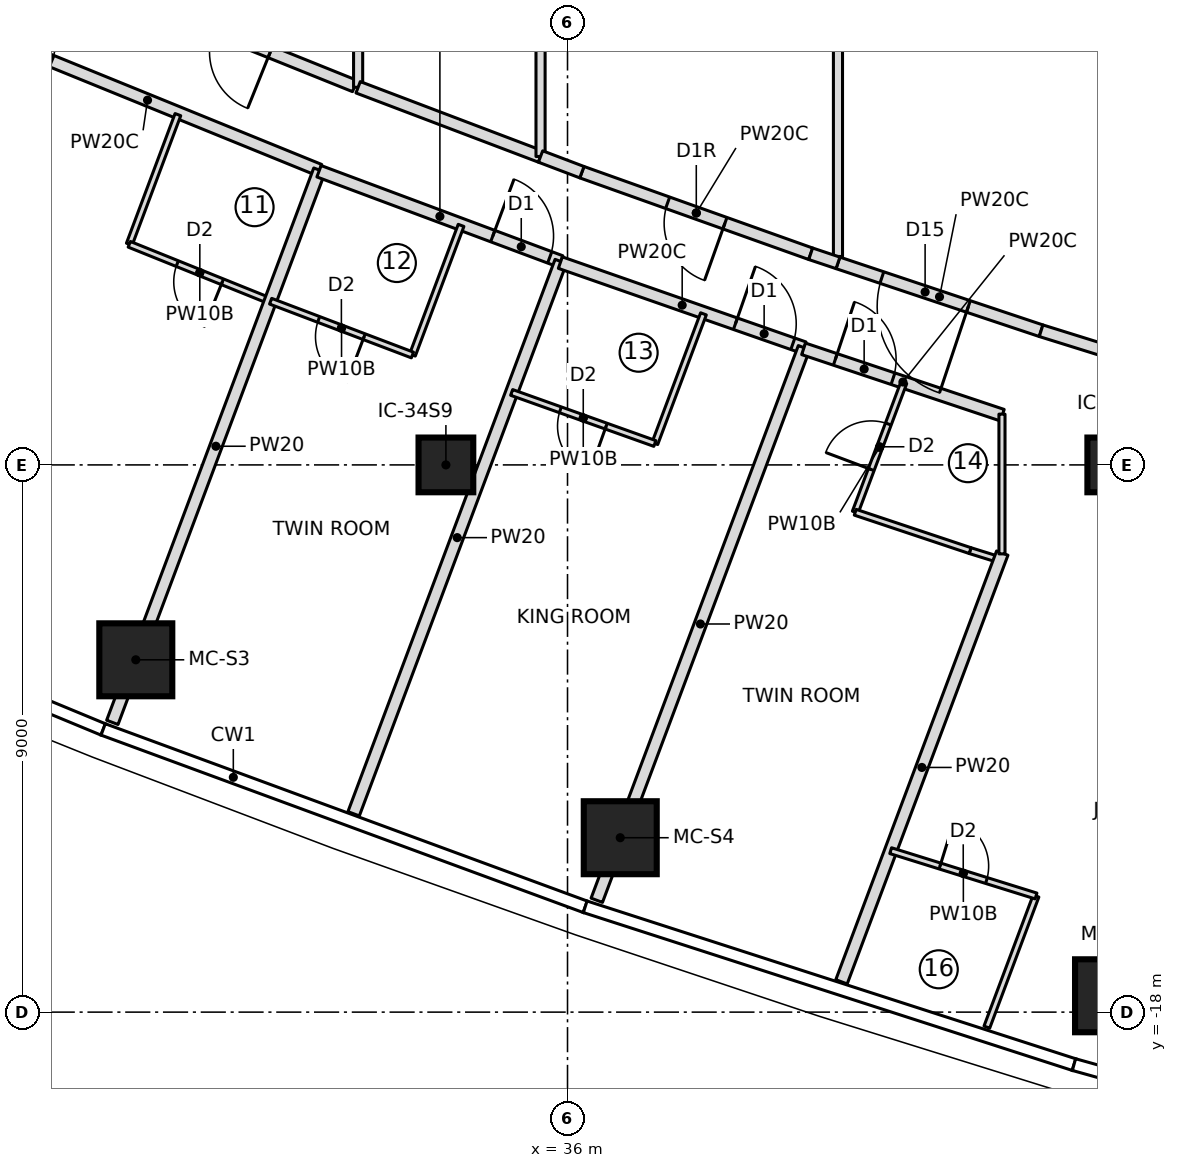
"""IFC4 building model, lengths in metres.
Left out: names, types, materials, properties, quantities, classifications, styles, units other than length and angle.
Written with IfcOpenShell. Run it as: python <this file> out.ifc"""

import sys

from ifc_helpers import new_model, si_unit, direction, frame, frame_2d, origin, origin_2d, place, context, subcontext, project, spatial, rectangle, extrude, element, fill, save


model = new_model("IFC4")
c1 = context("Model", 3, precision=1e-05, world=origin(), true_north=direction((0.0, 1.0)))
c2 = subcontext(c1, "Body", "Model", "MODEL_VIEW")
j1 = project(units=[si_unit("LENGTHUNIT", "METRE"), si_unit("PLANEANGLEUNIT", "RADIAN")], contexts=[c1])
p1 = place(None, origin())
s1 = spatial("IfcSite", under=j1, at=p1, CompositionType="ELEMENT")
p2 = place(p1, origin())
s2 = spatial("IfcBuilding", under=s1, at=p2, CompositionType="ELEMENT")
p3 = place(p2, frame((0.0, 0.0, 220.8)))
s3 = spatial("IfcBuildingStorey", under=s2, at=p3, CompositionType="ELEMENT", Elevation=220.8)
for number, where, z_axis, x_axis in (
    (1, (28.9, -12.205, 0.0), (0.0, 0.0, 1.0), (1.0, 0.0, 0.0)),
    (2, (36.867, -15.132, 0.0), (0.0, 0.0, 1.0), (1.0, 0.0, 0.0)),
    (3, (44.947, -17.731, 0.0), (0.0, 0.0, 1.0), (1.0, 0.0, 0.0)),
):
    element("IfcColumn", number, at=place(p3, frame(where, z_axis=z_axis, x_axis=x_axis)), inside=s3, PredefinedType="COLUMN", context=c2, shape_type="SweptSolid", body=[
        extrude(rectangle(XDim=1.2, YDim=1.2, at=origin_2d()), origin(), (0.0, 0.0, 1.0), 3.55),
    ])
for number, where, z_axis, x_axis in (
    (4, (34.0, -9.0, 0.0), (0.0, 0.0, 1.0), (1.0, 0.0, 0.0)),
    (5, (45.0, -9.0, 0.0), (0.0, 0.0, 1.0), (1.0, 0.0, 0.0)),
):
    element("IfcColumn", number, at=place(p3, frame(where, z_axis=z_axis, x_axis=x_axis)), inside=s3, PredefinedType="COLUMN", context=c2, shape_type="SweptSolid", body=[
        extrude(rectangle(XDim=0.9, YDim=0.9, at=origin_2d()), origin(), (0.0, 0.0, 1.0), 3.55),
    ])
p4 = place(p3, frame((26.266, -1.85, 0.0), z_axis=(0.0, 0.0, 1.0), x_axis=(0.926231512449, -0.376955150311, 0.0)))
e6 = element("IfcWall", 6, at=p4, inside=s3, PredefinedType="PARTITIONING", context=c2, shape_type="SweptSolid", body=[
    extrude(rectangle(XDim=6.105, YDim=0.2, at=frame_2d((3.052, 0.0))), origin(), (0.0, 0.0, 1.0), 3.25),
])
p5 = place(p4, frame((0.35, 0.0, 0.0)))
e7 = element("IfcOpeningElement", 7, at=p5, cuts=e6, PredefinedType="OPENING", context=c2, shape_type="SweptSolid", body=[
    extrude(rectangle(XDim=1.0, YDim=2.1, at=frame_2d((0.5, 1.05))), frame((0.0, 0.11, 0.0), z_axis=(0.0, -1.0, 0.0), x_axis=(1.0, 0.0, 0.0)), (0.0, 0.0, 1.0), 0.22),
])
p6 = place(p3, frame((28.793, -5.371, 0.0), z_axis=(0.0, 0.0, 1.0), x_axis=(0.351158682313, 0.936315961541, 0.0)))
e8 = element("IfcWall", 8, at=p6, inside=s3, PredefinedType="PARTITIONING", context=c2, shape_type="SweptSolid", body=[
    extrude(rectangle(XDim=2.278, YDim=0.1, at=frame_2d((1.139, 0.0))), origin(), (0.0, 0.0, 1.0), 3.25),
])
p7 = place(p3, frame((31.113, -6.306, 0.0), z_axis=(0.0, 0.0, 1.0), x_axis=(-0.92761232595, 0.373544338394, 0.0)))
e9 = element("IfcWall", 9, at=p7, inside=s3, PredefinedType="PARTITIONING", context=c2, shape_type="SweptSolid", body=[
    extrude(rectangle(XDim=2.5, YDim=0.1, at=frame_2d((1.25, 0.0))), origin(), (0.0, 0.0, 1.0), 3.25),
])
p8 = place(p7, frame((0.85, 0.0, 0.0)))
e10 = element("IfcOpeningElement", 10, at=p8, cuts=e9, PredefinedType="OPENING", context=c2, shape_type="SweptSolid", body=[
    extrude(rectangle(XDim=0.8, YDim=2.1, at=frame_2d((0.4, 1.05))), frame((0.0, 0.06, 0.0), z_axis=(0.0, -1.0, 0.0), x_axis=(1.0, 0.0, 0.0)), (0.0, 0.0, 1.0), 0.12),
])
p9 = place(p3, frame((28.514, -13.235, 0.0), z_axis=(0.0, 0.0, 1.0), x_axis=(0.351126199585, 0.936328143316, 0.0)))
e11 = element("IfcWall", 11, at=p9, inside=s3, PredefinedType="PARTITIONING", context=c2, shape_type="SweptSolid", body=[
    extrude(rectangle(XDim=9.701, YDim=0.2, at=frame_2d((4.851, 0.0))), origin(), (0.0, 0.0, 1.0), 3.25),
])
p10 = place(p3, frame((31.913, -4.17, 0.0), z_axis=(0.0, 0.0, 1.0), x_axis=(0.936848300955, -0.349735987565, 0.0)))
e12 = element("IfcWall", 12, at=p10, inside=s3, PredefinedType="PARTITIONING", context=c2, shape_type="SweptSolid", body=[
    extrude(rectangle(XDim=4.244, YDim=0.2, at=frame_2d((2.122, 0.0))), origin(), (0.0, 0.0, 1.0), 3.25),
])
p11 = place(p10, frame((3.05, 0.0, 0.0)))
e13 = element("IfcOpeningElement", 13, at=p11, cuts=e12, PredefinedType="OPENING", context=c2, shape_type="SweptSolid", body=[
    extrude(rectangle(XDim=1.0, YDim=2.1, at=frame_2d((0.5, 1.05))), frame((0.0, 0.11, 0.0), z_axis=(0.0, -1.0, 0.0), x_axis=(1.0, 0.0, 0.0)), (0.0, 0.0, 1.0), 0.22),
])
p12 = place(p3, frame((34.25, -5.061, 0.0), z_axis=(0.0, 0.0, 1.0), x_axis=(-0.351135191353, -0.936324771323, 0.0)))
e14 = element("IfcWall", 14, at=p12, inside=s3, PredefinedType="PARTITIONING", context=c2, shape_type="SweptSolid", body=[
    extrude(rectangle(XDim=2.277, YDim=0.1, at=frame_2d((1.139, 0.0))), origin(), (0.0, 0.0, 1.0), 3.25),
])
p13 = place(p3, frame((33.45, -7.193, 0.0), z_axis=(0.0, 0.0, 1.0), x_axis=(-0.93495051617, 0.354778145202, 0.0)))
e15 = element("IfcWall", 15, at=p13, inside=s3, PredefinedType="PARTITIONING", context=c2, shape_type="SweptSolid", body=[
    extrude(rectangle(XDim=2.495, YDim=0.1, at=frame_2d((1.247, 0.0))), origin(), (0.0, 0.0, 1.0), 3.25),
])
p14 = place(p13, frame((0.85, 0.0, 0.0)))
e16 = element("IfcOpeningElement", 16, at=p14, cuts=e15, PredefinedType="OPENING", context=c2, shape_type="SweptSolid", body=[
    extrude(rectangle(XDim=0.8, YDim=2.1, at=frame_2d((0.4, 1.05))), frame((0.0, 0.06, 0.0), z_axis=(0.0, -1.0, 0.0), x_axis=(1.0, 0.0, 0.0)), (0.0, 0.0, 1.0), 0.12),
])
p15 = place(p3, frame((32.483, -14.738, 0.0), z_axis=(0.0, 0.0, 1.0), x_axis=(0.351117925717, 0.936331246002, 0.0)))
e17 = element("IfcWall", 17, at=p15, inside=s3, PredefinedType="PARTITIONING", context=c2, shape_type="SweptSolid", body=[
    extrude(rectangle(XDim=9.701, YDim=0.2, at=frame_2d((4.851, 0.0))), origin(), (0.0, 0.0, 1.0), 3.25),
])
p16 = place(p3, frame((35.882, -5.673, 0.0), z_axis=(0.0, 0.0, 1.0), x_axis=(0.944107376821, -0.329638075823, 0.0)))
e18 = element("IfcWall", 18, at=p16, inside=s3, PredefinedType="PARTITIONING", context=c2, shape_type="SweptSolid", body=[
    extrude(rectangle(XDim=4.245, YDim=0.2, at=frame_2d((2.122, 0.0))), origin(), (0.0, 0.0, 1.0), 3.25),
])
p17 = place(p16, frame((3.05, 0.0, 0.0)))
e19 = element("IfcOpeningElement", 19, at=p17, cuts=e18, PredefinedType="OPENING", context=c2, shape_type="SweptSolid", body=[
    extrude(rectangle(XDim=1.0, YDim=2.1, at=frame_2d((0.5, 1.05))), frame((0.0, 0.11, 0.0), z_axis=(0.0, -1.0, 0.0), x_axis=(1.0, 0.0, 0.0)), (0.0, 0.0, 1.0), 0.22),
])
p18 = place(p3, frame((38.236, -6.516, 0.0), z_axis=(0.0, 0.0, 1.0), x_axis=(-0.351229183496, -0.936289517543, 0.0)))
e20 = element("IfcWall", 20, at=p18, inside=s3, PredefinedType="PARTITIONING", context=c2, shape_type="SweptSolid", body=[
    extrude(rectangle(XDim=2.277, YDim=0.1, at=frame_2d((1.139, 0.0))), origin(), (0.0, 0.0, 1.0), 3.25),
])
p19 = place(p3, frame((37.436, -8.648, 0.0), z_axis=(0.0, 0.0, 1.0), x_axis=(-0.941896455552, 0.335903359641, 0.0)))
e21 = element("IfcWall", 21, at=p19, inside=s3, PredefinedType="PARTITIONING", context=c2, shape_type="SweptSolid", body=[
    extrude(rectangle(XDim=2.5, YDim=0.1, at=frame_2d((1.25, 0.0))), origin(), (0.0, 0.0, 1.0), 3.25),
])
p20 = place(p19, frame((0.85, 0.0, 0.0)))
e22 = element("IfcOpeningElement", 22, at=p20, cuts=e21, PredefinedType="OPENING", context=c2, shape_type="SweptSolid", body=[
    extrude(rectangle(XDim=0.8, YDim=2.1, at=frame_2d((0.4, 1.05))), frame((0.0, 0.06, 0.0), z_axis=(0.0, -1.0, 0.0), x_axis=(1.0, 0.0, 0.0)), (0.0, 0.0, 1.0), 0.12),
])
p21 = place(p3, frame((36.481, -16.161, 0.0), z_axis=(0.0, 0.0, 1.0), x_axis=(0.35112895446, 0.936327110224, 0.0)))
e23 = element("IfcWall", 23, at=p21, inside=s3, PredefinedType="PARTITIONING", context=c2, shape_type="SweptSolid", body=[
    extrude(rectangle(XDim=9.706, YDim=0.2, at=frame_2d((4.853, 0.0))), origin(), (0.0, 0.0, 1.0), 3.25),
])
p22 = place(p3, frame((39.882, -7.091, 0.0), z_axis=(0.0, 0.0, 1.0), x_axis=(0.948477584784, -0.316844238013, 0.0)))
e24 = element("IfcWall", 24, at=p22, inside=s3, PredefinedType="PARTITIONING", context=c2, shape_type="SweptSolid", body=[
    extrude(rectangle(XDim=3.445, YDim=0.2, at=frame_2d((1.723, 0.0))), origin(), (0.0, 0.0, 1.0), 3.25),
])
p23 = place(p22, frame((0.55, 0.0, 0.0)))
e25 = element("IfcOpeningElement", 25, at=p23, cuts=e24, PredefinedType="OPENING", context=c2, shape_type="SweptSolid", body=[
    extrude(rectangle(XDim=1.0, YDim=2.1, at=frame_2d((0.5, 1.05))), frame((0.0, 0.11, 0.0), z_axis=(0.0, -1.0, 0.0), x_axis=(1.0, 0.0, 0.0)), (0.0, 0.0, 1.0), 0.22),
])
p24 = place(p3, frame((40.732, -9.779, 0.0), z_axis=(0.0, 0.0, 1.0), x_axis=(0.351146927505, 0.936320370014, 0.0)))
e26 = element("IfcWall", 26, at=p24, inside=s3, PredefinedType="PARTITIONING", context=c2, shape_type="SweptSolid", body=[
    extrude(rectangle(XDim=2.278, YDim=0.1, at=frame_2d((1.139, 0.0))), origin(), (0.0, 0.0, 1.0), 3.25),
])
p25 = place(p24, frame((0.75, 0.0, 0.0)))
e27 = element("IfcOpeningElement", 27, at=p25, cuts=e26, PredefinedType="OPENING", context=c2, shape_type="SweptSolid", body=[
    extrude(rectangle(XDim=0.8, YDim=2.1, at=frame_2d((0.4, 1.05))), frame((0.0, 0.06, 0.0), z_axis=(0.0, -1.0, 0.0), x_axis=(1.0, 0.0, 0.0)), (0.0, 0.0, 1.0), 0.12),
])
p26 = place(p3, frame((43.108, -10.562, 0.0), z_axis=(0.0, 0.0, 1.0), x_axis=(-0.954624465478, 0.297812239356, 0.0)))
e28 = element("IfcWall", 28, at=p26, inside=s3, PredefinedType="PARTITIONING", context=c2, shape_type="SweptSolid", body=[
    extrude(rectangle(XDim=0.511, YDim=0.1, at=frame_2d((0.255, 0.0))), origin(), (0.0, 0.0, 1.0), 3.25),
])
p27 = place(p3, frame((42.621, -10.409, 0.0), z_axis=(0.0, 0.0, 1.0), x_axis=(-0.948499248693, 0.316779379426, 0.0)))
e29 = element("IfcWall", 29, at=p27, inside=s3, PredefinedType="PARTITIONING", context=c2, shape_type="SweptSolid", body=[
    extrude(rectangle(XDim=1.991, YDim=0.1, at=frame_2d((0.996, 0.0))), origin(), (0.0, 0.0, 1.0), 3.25),
])
p28 = place(p3, frame((40.506, -17.501, 0.0), z_axis=(0.0, 0.0, 1.0), x_axis=(0.351119888923, 0.936330509811, 0.0)))
e30 = element("IfcWall", 30, at=p28, inside=s3, PredefinedType="PARTITIONING", context=c2, shape_type="SweptSolid", body=[
    extrude(rectangle(XDim=7.531, YDim=0.2, at=frame_2d((3.766, 0.0))), origin(), (0.0, 0.0, 1.0), 3.25),
])
p29 = place(p3, frame((43.705, -16.09, 0.0), z_axis=(0.0, 0.0, 1.0), x_axis=(-0.351111827312, -0.936333532841, 0.0)))
e31 = element("IfcWall", 31, at=p29, inside=s3, PredefinedType="PARTITIONING", context=c2, shape_type="SweptSolid", body=[
    extrude(rectangle(XDim=2.304, YDim=0.1, at=frame_2d((1.152, 0.0))), origin(), (0.0, 0.0, 1.0), 3.25),
])
p30 = place(p3, frame((41.315, -15.344, 0.0), z_axis=(0.0, 0.0, 1.0), x_axis=(0.954665433195, -0.297680887299, 0.0)))
e32 = element("IfcWall", 32, at=p30, inside=s3, PredefinedType="PARTITIONING", context=c2, shape_type="SweptSolid", body=[
    extrude(rectangle(XDim=2.504, YDim=0.1, at=frame_2d((1.252, 0.0))), origin(), (0.0, 0.0, 1.0), 3.25),
])
p31 = place(p30, frame((0.85, 0.0, 0.0)))
e33 = element("IfcOpeningElement", 33, at=p31, cuts=e32, PredefinedType="OPENING", context=c2, shape_type="SweptSolid", body=[
    extrude(rectangle(XDim=0.8, YDim=2.1, at=frame_2d((0.4, 1.05))), frame((0.0, 0.06, 0.0), z_axis=(0.0, -1.0, 0.0), x_axis=(1.0, 0.0, 0.0)), (0.0, 0.0, 1.0), 0.12),
])
p32 = place(p3, frame((32.501, -2.768, 0.0), z_axis=(0.0, 0.0, 1.0), x_axis=(-0.927622894464, 0.373518092823, 0.0)))
e34 = element("IfcWall", 34, at=p32, inside=s3, PredefinedType="PARTITIONING", context=c2, shape_type="SweptSolid", body=[
    extrude(rectangle(XDim=3.995, YDim=0.2, at=frame_2d((1.998, 0.0))), origin(), (0.0, 0.0, 1.0), 3.25),
])
p33 = place(p32, frame((1.498, 0.0, 0.0)))
e35 = element("IfcOpeningElement", 35, at=p33, cuts=e34, PredefinedType="OPENING", context=c2, shape_type="SweptSolid", body=[
    extrude(rectangle(XDim=1.0, YDim=2.1, at=frame_2d((0.5, 1.05))), frame((0.0, 0.11, 0.0), z_axis=(0.0, -1.0, 0.0), x_axis=(1.0, 0.0, 0.0)), (0.0, 0.0, 1.0), 0.22),
])
p34 = place(p3, frame((32.556, -2.789, 0.0), z_axis=(0.0, 0.0, 1.0), x_axis=(0.0, 1.0, 0.0)))
e36 = element("IfcWall", 36, at=p34, inside=s3, PredefinedType="PARTITIONING", context=c2, shape_type="SweptSolid", body=[
    extrude(rectangle(XDim=5.579, YDim=0.15, at=frame_2d((2.789, 0.0))), origin(), (0.0, 0.0, 1.0), 3.25),
])
p35 = place(p3, frame((35.556, -3.927, 0.0), z_axis=(0.0, 0.0, 1.0), x_axis=(-0.934971422854, 0.354723044706, 0.0)))
e37 = element("IfcWall", 37, at=p35, inside=s3, PredefinedType="PARTITIONING", context=c2, shape_type="SweptSolid", body=[
    extrude(rectangle(XDim=3.209, YDim=0.2, at=frame_2d((1.604, 0.0))), origin(), (0.0, 0.0, 1.0), 3.25),
])
p36 = place(p3, frame((35.556, -3.927, 0.0), z_axis=(0.0, 0.0, 1.0), x_axis=(0.0, 1.0, 0.0)))
e38 = element("IfcWall", 38, at=p36, inside=s3, PredefinedType="PARTITIONING", context=c2, shape_type="SweptSolid", body=[
    extrude(rectangle(XDim=7.855, YDim=0.15, at=frame_2d((3.927, 0.0))), origin(), (0.0, 0.0, 1.0), 3.25),
])
p37 = place(p3, frame((39.999, -5.527, 0.0), z_axis=(0.0, 0.0, 1.0), x_axis=(-0.941909090846, 0.335867927288, 0.0)))
e39 = element("IfcWall", 39, at=p37, inside=s3, PredefinedType="PARTITIONING", context=c2, shape_type="SweptSolid", body=[
    extrude(rectangle(XDim=3.995, YDim=0.2, at=frame_2d((1.998, 0.0))), origin(), (0.0, 0.0, 1.0), 3.25),
])
p38 = place(p37, frame((1.498, 0.0, 0.0)))
e40 = element("IfcOpeningElement", 40, at=p38, cuts=e39, PredefinedType="OPENING", context=c2, shape_type="SweptSolid", body=[
    extrude(rectangle(XDim=1.0, YDim=2.1, at=frame_2d((0.5, 1.05))), frame((0.0, 0.11, 0.0), z_axis=(0.0, -1.0, 0.0), x_axis=(1.0, 0.0, 0.0)), (0.0, 0.0, 1.0), 0.22),
])
p39 = place(p3, frame((36.236, -4.186, 0.0), z_axis=(0.0, 0.0, 1.0), x_axis=(-0.934928414106, 0.354836385533, 0.0)))
e41 = element("IfcWall", 41, at=p39, inside=s3, PredefinedType="PARTITIONING", context=c2, shape_type="SweptSolid", body=[
    extrude(rectangle(XDim=0.727, YDim=0.2, at=frame_2d((0.364, 0.0))), origin(), (0.0, 0.0, 1.0), 3.25),
])
p40 = place(p3, frame((40.448, -5.572, 0.0), z_axis=(0.0, 0.0, 1.0), x_axis=(0.0, 1.0, 0.0)))
e42 = element("IfcWall", 42, at=p40, inside=s3, PredefinedType="PARTITIONING", context=c2, shape_type="SweptSolid", body=[
    extrude(rectangle(XDim=11.249, YDim=0.15, at=frame_2d((5.625, 0.0))), origin(), (0.0, 0.0, 1.0), 3.25),
])
p41 = place(p3, frame((43.788, -6.793, 0.0), z_axis=(0.0, 0.0, 1.0), x_axis=(-0.948475139593, 0.316851557632, 0.0)))
e43 = element("IfcWall", 43, at=p41, inside=s3, PredefinedType="PARTITIONING", context=c2, shape_type="SweptSolid", body=[
    extrude(rectangle(XDim=3.522, YDim=0.2, at=frame_2d((1.761, 0.0))), origin(), (0.0, 0.0, 1.0), 3.25),
])
p42 = place(p41, frame((1.261, 0.0, 0.0)))
e44 = element("IfcOpeningElement", 44, at=p42, cuts=e43, PredefinedType="OPENING", context=c2, shape_type="SweptSolid", body=[
    extrude(rectangle(XDim=1.5, YDim=2.1, at=frame_2d((0.75, 1.05))), frame((0.0, 0.11, 0.0), z_axis=(0.0, -1.0, 0.0), x_axis=(1.0, 0.0, 0.0)), (0.0, 0.0, 1.0), 0.22),
])
p43 = place(p3, frame((44.933, -7.15, 0.0), z_axis=(0.0, 0.0, 1.0), x_axis=(-0.954693570678, 0.29759063511, 0.0)))
e45 = element("IfcWall", 45, at=p43, inside=s3, PredefinedType="PARTITIONING", context=c2, shape_type="SweptSolid", body=[
    extrude(rectangle(XDim=1.198, YDim=0.2, at=frame_2d((0.599, 0.0))), origin(), (0.0, 0.0, 1.0), 3.25),
])
p44 = place(p3, frame((43.145, -8.165, 0.0), z_axis=(0.0, 0.0, 1.0), x_axis=(0.0, -1.0, 0.0)))
e46 = element("IfcWall", 46, at=p44, inside=s3, PredefinedType="PARTITIONING", context=c2, shape_type="SweptSolid", body=[
    extrude(rectangle(XDim=2.298, YDim=0.1, at=frame_2d((1.149, 0.0))), origin(), (0.0, 0.0, 1.0), 3.25),
])
p45 = place(p3, frame((40.448, -5.677, 0.0), z_axis=(0.0, 0.0, 1.0), x_axis=(-0.948424836926, 0.317002095739, 0.0)))
e47 = element("IfcWall", 47, at=p45, inside=s3, PredefinedType="PARTITIONING", context=c2, shape_type="SweptSolid", body=[
    extrude(rectangle(XDim=0.473, YDim=0.2, at=frame_2d((0.236, 0.0))), origin(), (0.0, 0.0, 1.0), 3.25),
])
p46 = place(p8, origin())
e48 = element("IfcDoor", 48, at=p46, inside=s3, OperationType="SINGLE_SWING_LEFT", PredefinedType="DOOR", context=c2, shape_type="SweptSolid", body=[
    extrude(rectangle(XDim=0.8, YDim=2.1, at=frame_2d((0.4, 1.05))), frame((0.0, 0.025, 0.0), z_axis=(0.0, -1.0, 0.0), x_axis=(1.0, 0.0, 0.0)), (0.0, 0.0, 1.0), 0.05),
])
fill(e10, e48)
p47 = place(p5, origin())
e49 = element("IfcDoor", 49, at=p47, inside=s3, OperationType="SINGLE_SWING_LEFT", PredefinedType="DOOR", context=c2, shape_type="SweptSolid", body=[
    extrude(rectangle(XDim=1.0, YDim=2.1, at=frame_2d((0.5, 1.05))), frame((0.0, 0.025, 0.0), z_axis=(0.0, -1.0, 0.0), x_axis=(1.0, 0.0, 0.0)), (0.0, 0.0, 1.0), 0.05),
])
fill(e7, e49)
p48 = place(p14, origin())
e50 = element("IfcDoor", 50, at=p48, inside=s3, OperationType="SINGLE_SWING_LEFT", PredefinedType="DOOR", context=c2, shape_type="SweptSolid", body=[
    extrude(rectangle(XDim=0.8, YDim=2.1, at=frame_2d((0.4, 1.05))), frame((0.0, 0.025, 0.0), z_axis=(0.0, -1.0, 0.0), x_axis=(1.0, 0.0, 0.0)), (0.0, 0.0, 1.0), 0.05),
])
fill(e16, e50)
p49 = place(p11, origin())
e51 = element("IfcDoor", 51, at=p49, inside=s3, OperationType="SINGLE_SWING_LEFT", PredefinedType="DOOR", context=c2, shape_type="SweptSolid", body=[
    extrude(rectangle(XDim=1.0, YDim=2.1, at=frame_2d((0.5, 1.05))), frame((0.0, 0.025, 0.0), z_axis=(0.0, -1.0, 0.0), x_axis=(1.0, 0.0, 0.0)), (0.0, 0.0, 1.0), 0.05),
])
fill(e13, e51)
p50 = place(p20, origin())
e52 = element("IfcDoor", 52, at=p50, inside=s3, OperationType="SINGLE_SWING_LEFT", PredefinedType="DOOR", context=c2, shape_type="SweptSolid", body=[
    extrude(rectangle(XDim=0.8, YDim=2.1, at=frame_2d((0.4, 1.05))), frame((0.0, 0.025, 0.0), z_axis=(0.0, -1.0, 0.0), x_axis=(1.0, 0.0, 0.0)), (0.0, 0.0, 1.0), 0.05),
])
fill(e22, e52)
p51 = place(p17, origin())
e53 = element("IfcDoor", 53, at=p51, inside=s3, OperationType="SINGLE_SWING_LEFT", PredefinedType="DOOR", context=c2, shape_type="SweptSolid", body=[
    extrude(rectangle(XDim=1.0, YDim=2.1, at=frame_2d((0.5, 1.05))), frame((0.0, 0.025, 0.0), z_axis=(0.0, -1.0, 0.0), x_axis=(1.0, 0.0, 0.0)), (0.0, 0.0, 1.0), 0.05),
])
fill(e19, e53)
p52 = place(p25, origin())
e54 = element("IfcDoor", 54, at=p52, inside=s3, OperationType="SINGLE_SWING_LEFT", PredefinedType="DOOR", context=c2, shape_type="SweptSolid", body=[
    extrude(rectangle(XDim=0.8, YDim=2.1, at=frame_2d((0.4, 1.05))), frame((0.0, 0.025, 0.0), z_axis=(0.0, -1.0, 0.0), x_axis=(1.0, 0.0, 0.0)), (0.0, 0.0, 1.0), 0.05),
])
fill(e27, e54)
p53 = place(p23, origin())
e55 = element("IfcDoor", 55, at=p53, inside=s3, OperationType="SINGLE_SWING_LEFT", PredefinedType="DOOR", context=c2, shape_type="SweptSolid", body=[
    extrude(rectangle(XDim=1.0, YDim=2.1, at=frame_2d((0.5, 1.05))), frame((0.0, 0.025, 0.0), z_axis=(0.0, -1.0, 0.0), x_axis=(1.0, 0.0, 0.0)), (0.0, 0.0, 1.0), 0.05),
])
fill(e25, e55)
p54 = place(p31, origin())
e56 = element("IfcDoor", 56, at=p54, inside=s3, OperationType="SINGLE_SWING_LEFT", PredefinedType="DOOR", context=c2, shape_type="SweptSolid", body=[
    extrude(rectangle(XDim=0.8, YDim=2.1, at=frame_2d((0.4, 1.05))), frame((0.0, 0.025, 0.0), z_axis=(0.0, -1.0, 0.0), x_axis=(1.0, 0.0, 0.0)), (0.0, 0.0, 1.0), 0.05),
])
fill(e33, e56)
p55 = place(p33, origin())
e57 = element("IfcDoor", 57, at=p55, inside=s3, OperationType="SINGLE_SWING_RIGHT", PredefinedType="DOOR", context=c2, shape_type="SweptSolid", body=[
    extrude(rectangle(XDim=1.0, YDim=2.1, at=frame_2d((0.5, 1.05))), frame((0.0, 0.025, 0.0), z_axis=(0.0, -1.0, 0.0), x_axis=(1.0, 0.0, 0.0)), (0.0, 0.0, 1.0), 0.05),
])
fill(e35, e57)
p56 = place(p38, origin())
e58 = element("IfcDoor", 58, at=p56, inside=s3, OperationType="SINGLE_SWING_RIGHT", PredefinedType="DOOR", context=c2, shape_type="SweptSolid", body=[
    extrude(rectangle(XDim=1.0, YDim=2.1, at=frame_2d((0.5, 1.05))), frame((0.0, 0.025, 0.0), z_axis=(0.0, -1.0, 0.0), x_axis=(1.0, 0.0, 0.0)), (0.0, 0.0, 1.0), 0.05),
])
fill(e40, e58)
p57 = place(p42, origin())
e59 = element("IfcDoor", 59, at=p57, inside=s3, OperationType="DOUBLE_DOOR_SINGLE_SWING", PredefinedType="DOOR", context=c2, shape_type="SweptSolid", body=[
    extrude(rectangle(XDim=1.5, YDim=2.1, at=frame_2d((0.75, 1.05))), frame((0.0, 0.025, 0.0), z_axis=(0.0, -1.0, 0.0), x_axis=(1.0, 0.0, 0.0)), (0.0, 0.0, 1.0), 0.05),
])
fill(e44, e59)
save(model, sys.argv[1])
